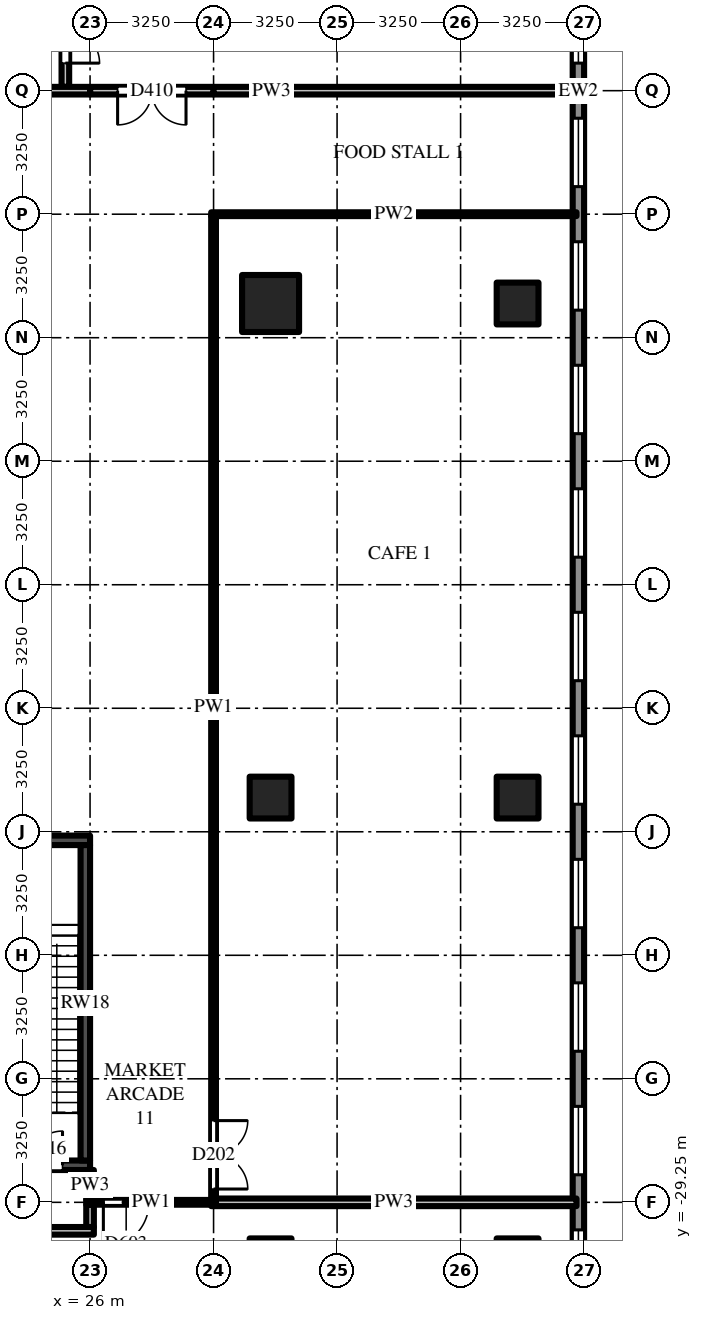
"""IFC4 building model, lengths in metres.
Left out: names, types, materials, properties, quantities, classifications, styles, units other than length and angle.
Written with IfcOpenShell. Run it as: python <this file> out.ifc"""

import sys

from ifc_helpers import new_model, si_unit, direction, frame, frame_2d, origin, origin_2d, place, context, subcontext, project, spatial, rectangle, extrude, source, transform, mapped, element, fill, save


model = new_model("IFC4")
c1 = context("Model", 3, precision=1e-05, world=origin(), true_north=direction((0.0, 1.0)))
c2 = subcontext(c1, "Body", "Model", "MODEL_VIEW")
j1 = project(units=[si_unit("LENGTHUNIT", "METRE"), si_unit("PLANEANGLEUNIT", "RADIAN")], contexts=[c1])
p1 = place(None, origin())
s1 = spatial("IfcSite", under=j1, at=p1, CompositionType="ELEMENT")
p2 = place(p1, origin())
s2 = spatial("IfcBuilding", under=s1, at=p2, CompositionType="ELEMENT")
p3 = place(p2, frame((0.0, 0.0, 19.0)))
s3 = spatial("IfcBuildingStorey", under=s2, at=p3, CompositionType="ELEMENT", Elevation=19.0)
m1 = source(origin(), c2, "Body", "SweptSolid", [
    extrude(rectangle(XDim=1.5, YDim=1.5, at=origin_2d()), origin(), (0.0, 0.0, 1.0), 5.0),
])
p4 = place(p3, frame((30.75, -5.6, 0.0), z_axis=(0.0, 0.0, 1.0), x_axis=(1.0, 0.0, 0.0)))
e1 = element("IfcColumn", 1, at=p4, inside=s3, PredefinedType="COLUMN", context=c2, shape_type="MappedRepresentation", body=[
    mapped(m1, transform((0.0, 0.0, 0.0))),
])
m2 = source(origin(), c2, "Body", "SweptSolid", [
    extrude(rectangle(XDim=1.1, YDim=1.1, at=origin_2d()), origin(), (0.0, 0.0, 1.0), 5.0),
])
for number, where, z_axis, x_axis in (
    (2, (30.75, -18.6, 0.0), (0.0, 0.0, 1.0), (1.0, 0.0, 0.0)),
    (3, (30.75, -30.75, 0.0), (0.0, 0.0, 1.0), (1.0, 0.0, 0.0)),
    (4, (37.25, -5.6, 0.0), (0.0, 0.0, 1.0), (1.0, 0.0, 0.0)),
    (5, (37.25, -18.6, 0.0), (0.0, 0.0, 1.0), (1.0, 0.0, 0.0)),
    (6, (37.25, -30.75, 0.0), (0.0, 0.0, 1.0), (1.0, 0.0, 0.0)),
):
    element("IfcColumn", number, at=place(p3, frame(where, z_axis=z_axis, x_axis=x_axis)), inside=s3, PredefinedType="COLUMN", context=c2, shape_type="MappedRepresentation", body=[
        mapped(m2, transform((0.0, 0.0, 0.0))),
    ])
m3 = source(origin(), c2, "Body", "SweptSolid", [
    extrude(rectangle(XDim=6.5, YDim=0.25, at=frame_2d((3.25, 0.0))), origin(), (0.0, 0.0, 1.0), 4.7),
])
p5 = place(p3, frame((19.5, -28.275, 0.0), z_axis=(0.0, 0.0, 1.0), x_axis=(1.0, 0.0, 0.0)))
e7 = element("IfcWall", 7, at=p5, inside=s3, PredefinedType="SHEAR", context=c2, shape_type="MappedRepresentation", body=[
    mapped(m3, transform((0.0, 0.0, 0.0))),
])
m4 = source(origin(), c2, "Body", "SweptSolid", [
    extrude(rectangle(XDim=1.8, YDim=2.1, at=frame_2d((0.9, 1.05))), frame((0.0, 0.135, 0.0), z_axis=(0.0, -1.0, 0.0), x_axis=(1.0, 0.0, 0.0)), (0.0, 0.0, 1.0), 0.27),
])
p6 = place(p5, frame((0.725, 0.0, 0.0)))
e8 = element("IfcOpeningElement", 8, at=p6, cuts=e7, PredefinedType="OPENING", context=c2, shape_type="MappedRepresentation", body=[
    mapped(m4, transform((0.0, 0.0, 0.0))),
])
p7 = place(p5, frame((3.975, 0.0, 0.0)))
e9 = element("IfcOpeningElement", 9, at=p7, cuts=e7, PredefinedType="OPENING", context=c2, shape_type="MappedRepresentation", body=[
    mapped(m4, transform((0.0, 0.0, 0.0))),
])
p8 = place(p3, frame((19.5, -19.725, 0.0), z_axis=(0.0, 0.0, 1.0), x_axis=(1.0, 0.0, 0.0)))
e10 = element("IfcWall", 10, at=p8, inside=s3, PredefinedType="SHEAR", context=c2, shape_type="MappedRepresentation", body=[
    mapped(m3, transform((0.0, 0.0, 0.0))),
])
m5 = source(origin(), c2, "Body", "SweptSolid", [
    extrude(rectangle(XDim=8.3, YDim=0.25, at=frame_2d((4.15, 0.0))), origin(), (0.0, 0.0, 1.0), 4.7),
])
p9 = place(p3, frame((25.875, -28.15, 0.0), z_axis=(0.0, 0.0, 1.0), x_axis=(0.0, 1.0, 0.0)))
e11 = element("IfcWall", 11, at=p9, inside=s3, PredefinedType="SHEAR", context=c2, shape_type="MappedRepresentation", body=[
    mapped(m5, transform((0.0, 0.0, 0.0))),
])
m6 = source(origin(), c2, "Body", "SweptSolid", [
    extrude(rectangle(XDim=71.5, YDim=0.3, at=frame_2d((35.75, 0.0))), origin(), (0.0, 0.0, 1.0), 4.7),
])
p10 = place(p3, frame((38.85, -35.75, 0.0), z_axis=(0.0, 0.0, 1.0), x_axis=(0.0, 1.0, 0.0)))
e12 = element("IfcWall", 12, at=p10, inside=s3, PredefinedType="SOLIDWALL", context=c2, shape_type="MappedRepresentation", body=[
    mapped(m6, transform((0.0, 0.0, 0.0))),
])
m7 = source(origin(), c2, "Body", "SweptSolid", [
    extrude(rectangle(XDim=1.8, YDim=3.0, at=frame_2d((0.9, 1.5))), frame((0.0, 0.16, 0.0), z_axis=(0.0, -1.0, 0.0), x_axis=(1.0, 0.0, 0.0)), (0.0, 0.0, 1.0), 0.32),
])
p11 = place(p10, frame((0.725, 0.0, 0.9)))
e13 = element("IfcOpeningElement", 13, at=p11, cuts=e12, PredefinedType="OPENING", context=c2, shape_type="MappedRepresentation", body=[
    mapped(m7, transform((0.0, 0.0, 0.0))),
])
p12 = place(p10, frame((3.975, 0.0, 0.9)))
e14 = element("IfcOpeningElement", 14, at=p12, cuts=e12, PredefinedType="OPENING", context=c2, shape_type="MappedRepresentation", body=[
    mapped(m7, transform((0.0, 0.0, 0.0))),
])
p13 = place(p10, frame((7.225, 0.0, 0.9)))
e15 = element("IfcOpeningElement", 15, at=p13, cuts=e12, PredefinedType="OPENING", context=c2, shape_type="MappedRepresentation", body=[
    mapped(m7, transform((0.0, 0.0, 0.0))),
])
p14 = place(p10, frame((10.475, 0.0, 0.9)))
e16 = element("IfcOpeningElement", 16, at=p14, cuts=e12, PredefinedType="OPENING", context=c2, shape_type="MappedRepresentation", body=[
    mapped(m7, transform((0.0, 0.0, 0.0))),
])
p15 = place(p10, frame((13.725, 0.0, 0.9)))
e17 = element("IfcOpeningElement", 17, at=p15, cuts=e12, PredefinedType="OPENING", context=c2, shape_type="MappedRepresentation", body=[
    mapped(m7, transform((0.0, 0.0, 0.0))),
])
p16 = place(p10, frame((16.975, 0.0, 0.9)))
e18 = element("IfcOpeningElement", 18, at=p16, cuts=e12, PredefinedType="OPENING", context=c2, shape_type="MappedRepresentation", body=[
    mapped(m7, transform((0.0, 0.0, 0.0))),
])
p17 = place(p10, frame((20.225, 0.0, 0.9)))
e19 = element("IfcOpeningElement", 19, at=p17, cuts=e12, PredefinedType="OPENING", context=c2, shape_type="MappedRepresentation", body=[
    mapped(m7, transform((0.0, 0.0, 0.0))),
])
p18 = place(p10, frame((23.475, 0.0, 0.9)))
e20 = element("IfcOpeningElement", 20, at=p18, cuts=e12, PredefinedType="OPENING", context=c2, shape_type="MappedRepresentation", body=[
    mapped(m7, transform((0.0, 0.0, 0.0))),
])
p19 = place(p10, frame((26.725, 0.0, 0.9)))
e21 = element("IfcOpeningElement", 21, at=p19, cuts=e12, PredefinedType="OPENING", context=c2, shape_type="MappedRepresentation", body=[
    mapped(m7, transform((0.0, 0.0, 0.0))),
])
p20 = place(p10, frame((29.975, 0.0, 0.9)))
e22 = element("IfcOpeningElement", 22, at=p20, cuts=e12, PredefinedType="OPENING", context=c2, shape_type="MappedRepresentation", body=[
    mapped(m7, transform((0.0, 0.0, 0.0))),
])
p21 = place(p10, frame((33.225, 0.0, 0.9)))
e23 = element("IfcOpeningElement", 23, at=p21, cuts=e12, PredefinedType="OPENING", context=c2, shape_type="MappedRepresentation", body=[
    mapped(m7, transform((0.0, 0.0, 0.0))),
])
p22 = place(p10, frame((36.475, 0.0, 0.9)))
e24 = element("IfcOpeningElement", 24, at=p22, cuts=e12, PredefinedType="OPENING", context=c2, shape_type="MappedRepresentation", body=[
    mapped(m7, transform((0.0, 0.0, 0.0))),
])
p23 = place(p10, frame((39.725, 0.0, 0.9)))
e25 = element("IfcOpeningElement", 25, at=p23, cuts=e12, PredefinedType="OPENING", context=c2, shape_type="MappedRepresentation", body=[
    mapped(m7, transform((0.0, 0.0, 0.0))),
])
p24 = place(p10, frame((42.975, 0.0, 0.9)))
e26 = element("IfcOpeningElement", 26, at=p24, cuts=e12, PredefinedType="OPENING", context=c2, shape_type="MappedRepresentation", body=[
    mapped(m7, transform((0.0, 0.0, 0.0))),
])
p25 = place(p10, frame((46.225, 0.0, 0.9)))
e27 = element("IfcOpeningElement", 27, at=p25, cuts=e12, PredefinedType="OPENING", context=c2, shape_type="MappedRepresentation", body=[
    mapped(m7, transform((0.0, 0.0, 0.0))),
])
p26 = place(p10, frame((49.475, 0.0, 0.9)))
e28 = element("IfcOpeningElement", 28, at=p26, cuts=e12, PredefinedType="OPENING", context=c2, shape_type="MappedRepresentation", body=[
    mapped(m7, transform((0.0, 0.0, 0.0))),
])
p27 = place(p10, frame((52.725, 0.0, 0.9)))
e29 = element("IfcOpeningElement", 29, at=p27, cuts=e12, PredefinedType="OPENING", context=c2, shape_type="MappedRepresentation", body=[
    mapped(m7, transform((0.0, 0.0, 0.0))),
])
p28 = place(p10, frame((55.975, 0.0, 0.9)))
e30 = element("IfcOpeningElement", 30, at=p28, cuts=e12, PredefinedType="OPENING", context=c2, shape_type="MappedRepresentation", body=[
    mapped(m7, transform((0.0, 0.0, 0.0))),
])
p29 = place(p10, frame((59.225, 0.0, 0.9)))
e31 = element("IfcOpeningElement", 31, at=p29, cuts=e12, PredefinedType="OPENING", context=c2, shape_type="MappedRepresentation", body=[
    mapped(m7, transform((0.0, 0.0, 0.0))),
])
p30 = place(p10, frame((62.475, 0.0, 0.9)))
e32 = element("IfcOpeningElement", 32, at=p30, cuts=e12, PredefinedType="OPENING", context=c2, shape_type="MappedRepresentation", body=[
    mapped(m7, transform((0.0, 0.0, 0.0))),
])
p31 = place(p10, frame((65.725, 0.0, 0.9)))
e33 = element("IfcOpeningElement", 33, at=p31, cuts=e12, PredefinedType="OPENING", context=c2, shape_type="MappedRepresentation", body=[
    mapped(m7, transform((0.0, 0.0, 0.0))),
])
p32 = place(p10, frame((68.975, 0.0, 0.9)))
e34 = element("IfcOpeningElement", 34, at=p32, cuts=e12, PredefinedType="OPENING", context=c2, shape_type="MappedRepresentation", body=[
    mapped(m7, transform((0.0, 0.0, 0.0))),
])
m8 = source(origin(), c2, "Body", "SweptSolid", [
    extrude(rectangle(XDim=3.05, YDim=0.2, at=frame_2d((1.525, 0.0))), origin(), (0.0, 0.0, 1.0), 4.077),
])
p33 = place(p3, frame((25.35, 3.15, 0.0), z_axis=(0.0, 0.0, 1.0), x_axis=(0.0, -1.0, 0.0)))
e35 = element("IfcWall", 35, at=p33, inside=s3, PredefinedType="PARTITIONING", context=c2, shape_type="MappedRepresentation", body=[
    mapped(m8, transform((0.0, 0.0, 0.0))),
])
m9 = source(origin(), c2, "Body", "SweptSolid", [
    extrude(rectangle(XDim=1.8, YDim=2.1, at=frame_2d((0.9, 1.05))), frame((0.0, 0.11, 0.0), z_axis=(0.0, -1.0, 0.0), x_axis=(1.0, 0.0, 0.0)), (0.0, 0.0, 1.0), 0.22),
])
p34 = place(p33, frame((0.625, 0.0, 0.0)))
e36 = element("IfcOpeningElement", 36, at=p34, cuts=e35, PredefinedType="OPENING", context=c2, shape_type="MappedRepresentation", body=[
    mapped(m9, transform((0.0, 0.0, 0.0))),
])
m10 = source(origin(), c2, "Body", "SweptSolid", [
    extrude(rectangle(XDim=0.788, YDim=0.2, at=frame_2d((0.394, 0.0))), origin(), (0.0, 0.0, 1.0), 4.7),
])
p35 = place(p3, frame((26.0, -29.188, 0.0), z_axis=(0.0, 0.0, 1.0), x_axis=(0.0, 1.0, 0.0)))
e37 = element("IfcWall", 37, at=p35, inside=s3, PredefinedType="PARTITIONING", context=c2, shape_type="MappedRepresentation", body=[
    mapped(m10, transform((0.0, 0.0, 0.0))),
])
m11 = source(origin(), c2, "Body", "SweptSolid", [
    extrude(rectangle(XDim=0.587, YDim=0.2, at=frame_2d((0.294, 0.0))), origin(), (0.0, 0.0, 1.0), 4.7),
])
p36 = place(p3, frame((26.0, -29.312, 0.0), z_axis=(0.0, 0.0, 1.0), x_axis=(0.0, -1.0, 0.0)))
e38 = element("IfcWall", 38, at=p36, inside=s3, PredefinedType="PARTITIONING", context=c2, shape_type="MappedRepresentation", body=[
    mapped(m11, transform((0.0, 0.0, 0.0))),
])
p37 = place(p3, frame((29.25, -3.3, 0.0), z_axis=(0.0, 0.0, 1.0), x_axis=(0.0, -1.0, 0.0)))
e39 = element("IfcWall", 39, at=p37, inside=s3, PredefinedType="PARTITIONING", context=c2, shape_type="SweptSolid", body=[
    extrude(rectangle(XDim=25.85, YDim=0.125, at=frame_2d((12.925, 0.0))), origin(), (0.0, 0.0, 1.0), 3.762),
])
m12 = source(origin(), c2, "Body", "SweptSolid", [
    extrude(rectangle(XDim=1.8, YDim=2.1, at=frame_2d((0.9, 1.05))), frame((0.0, 0.073, 0.0), z_axis=(0.0, -1.0, 0.0), x_axis=(1.0, 0.0, 0.0)), (0.0, 0.0, 1.0), 0.145),
])
p38 = place(p37, frame((23.8, 0.0, 0.0)))
e40 = element("IfcOpeningElement", 40, at=p38, cuts=e39, PredefinedType="OPENING", context=c2, shape_type="MappedRepresentation", body=[
    mapped(m12, transform((0.0, 0.0, 0.0))),
])
m13 = source(origin(), c2, "Body", "SweptSolid", [
    extrude(rectangle(XDim=8.2, YDim=0.2, at=frame_2d((4.1, 0.0))), origin(), (0.0, 0.0, 1.0), 3.762),
])
p39 = place(p3, frame((26.1, -30.0, 0.0), z_axis=(0.0, 0.0, 1.0), x_axis=(-1.0, 0.0, 0.0)))
e41 = element("IfcWall", 41, at=p39, inside=s3, PredefinedType="PARTITIONING", context=c2, shape_type="MappedRepresentation", body=[
    mapped(m13, transform((0.0, 0.0, 0.0))),
])
m14 = source(origin(), c2, "Body", "SweptSolid", [
    extrude(rectangle(XDim=9.613, YDim=0.2, at=frame_2d((4.806, 0.0))), origin(), (0.0, 0.0, 1.0), 3.762),
])
p40 = place(p3, frame((29.188, -29.25, 0.0), z_axis=(0.0, 0.0, 1.0), x_axis=(1.0, 0.0, 0.0)))
e42 = element("IfcWall", 42, at=p40, inside=s3, PredefinedType="PARTITIONING", context=c2, shape_type="MappedRepresentation", body=[
    mapped(m14, transform((0.0, 0.0, 0.0))),
])
m15 = source(origin(), c2, "Body", "SweptSolid", [
    extrude(rectangle(XDim=3.413, YDim=0.125, at=frame_2d((1.706, 0.0))), origin(), (0.0, 0.0, 1.0), 4.7),
])
p41 = place(p3, frame((29.312, -29.25, 0.0), z_axis=(0.0, 0.0, 1.0), x_axis=(-1.0, 0.0, 0.0)))
e43 = element("IfcWall", 43, at=p41, inside=s3, PredefinedType="PARTITIONING", context=c2, shape_type="MappedRepresentation", body=[
    mapped(m15, transform((0.0, 0.0, 0.0))),
])
m16 = source(origin(), c2, "Body", "SweptSolid", [
    extrude(rectangle(XDim=1.2, YDim=2.1, at=frame_2d((0.6, 1.05))), frame((0.0, 0.073, 0.0), z_axis=(0.0, -1.0, 0.0), x_axis=(1.0, 0.0, 0.0)), (0.0, 0.0, 1.0), 0.145),
])
p42 = place(p41, frame((1.762, 0.0, 0.0)))
e44 = element("IfcOpeningElement", 44, at=p42, cuts=e43, PredefinedType="OPENING", context=c2, shape_type="MappedRepresentation", body=[
    mapped(m16, transform((0.0, 0.0, 0.0))),
])
p43 = place(p3, frame((29.188, -3.25, 0.0), z_axis=(0.0, 0.0, 1.0), x_axis=(1.0, 0.0, 0.0)))
e45 = element("IfcWall", 45, at=p43, inside=s3, PredefinedType="PARTITIONING", context=c2, shape_type="SweptSolid", body=[
    extrude(rectangle(XDim=9.613, YDim=0.1, at=frame_2d((4.806, 0.0))), origin(), (0.0, 0.0, 1.0), 3.918),
])
m17 = source(origin(), c2, "Body", "SweptSolid", [
    extrude(rectangle(XDim=3.25, YDim=0.2, at=frame_2d((1.625, 0.0))), origin(), (0.0, 0.0, 1.0), 4.077),
])
p44 = place(p3, frame((29.25, 0.0, 0.0), z_axis=(0.0, 0.0, 1.0), x_axis=(-1.0, 0.0, 0.0)))
e46 = element("IfcWall", 46, at=p44, inside=s3, PredefinedType="PARTITIONING", context=c2, shape_type="MappedRepresentation", body=[
    mapped(m17, transform((0.0, 0.0, 0.0))),
])
p45 = place(p44, frame((0.725, 0.0, 0.0)))
e47 = element("IfcOpeningElement", 47, at=p45, cuts=e46, PredefinedType="OPENING", context=c2, shape_type="MappedRepresentation", body=[
    mapped(m9, transform((0.0, 0.0, 0.0))),
])
m18 = source(origin(), c2, "Body", "SweptSolid", [
    extrude(rectangle(XDim=2.0, YDim=0.2, at=frame_2d((1.0, 0.0))), origin(), (0.0, 0.0, 1.0), 4.077),
])
p46 = place(p3, frame((26.0, 0.0, 0.0), z_axis=(0.0, 0.0, 1.0), x_axis=(-1.0, 0.0, 0.0)))
e48 = element("IfcWall", 48, at=p46, inside=s3, PredefinedType="PARTITIONING", context=c2, shape_type="MappedRepresentation", body=[
    mapped(m18, transform((0.0, 0.0, 0.0))),
])
m19 = source(origin(), c2, "Body", "SweptSolid", [
    extrude(rectangle(XDim=9.55, YDim=0.2, at=frame_2d((4.775, 0.0))), origin(), (0.0, 0.0, 1.0), 3.918),
])
p47 = place(p3, frame((38.8, 0.0, 0.0), z_axis=(0.0, 0.0, 1.0), x_axis=(-1.0, 0.0, 0.0)))
e49 = element("IfcWall", 49, at=p47, inside=s3, PredefinedType="PARTITIONING", context=c2, shape_type="MappedRepresentation", body=[
    mapped(m19, transform((0.0, 0.0, 0.0))),
])
m20 = source(origin(), c2, "Body", "SweptSolid", [
    extrude(rectangle(XDim=1.8, YDim=2.1, at=frame_2d((0.9, 1.05))), frame((0.0, 0.025, 0.0), z_axis=(0.0, -1.0, 0.0), x_axis=(1.0, 0.0, 0.0)), (0.0, 0.0, 1.0), 0.05),
])
p48 = place(p7, origin())
e50 = element("IfcDoor", 50, at=p48, inside=s3, OperationType="DOUBLE_DOOR_SINGLE_SWING", PredefinedType="DOOR", context=c2, shape_type="MappedRepresentation", body=[
    mapped(m20, transform((0.0, 0.0, 0.0))),
])
fill(e9, e50)
m21 = source(origin(), c2, "Body", "SweptSolid", [
    extrude(rectangle(XDim=1.8, YDim=3.0, at=frame_2d((0.9, 1.5))), frame((0.0, 0.03, 0.0), z_axis=(0.0, -1.0, 0.0), x_axis=(1.0, 0.0, 0.0)), (0.0, 0.0, 1.0), 0.06),
])
p49 = place(p12, origin())
e51 = element("IfcWindow", 51, at=p49, inside=s3, PartitioningType="SINGLE_PANEL", PredefinedType="WINDOW", context=c2, shape_type="MappedRepresentation", body=[
    mapped(m21, transform((0.0, 0.0, 0.0))),
])
fill(e14, e51)
p50 = place(p13, origin())
e52 = element("IfcWindow", 52, at=p50, inside=s3, PartitioningType="SINGLE_PANEL", PredefinedType="WINDOW", context=c2, shape_type="MappedRepresentation", body=[
    mapped(m21, transform((0.0, 0.0, 0.0))),
])
fill(e15, e52)
p51 = place(p14, origin())
e53 = element("IfcWindow", 53, at=p51, inside=s3, PartitioningType="SINGLE_PANEL", PredefinedType="WINDOW", context=c2, shape_type="MappedRepresentation", body=[
    mapped(m21, transform((0.0, 0.0, 0.0))),
])
fill(e16, e53)
p52 = place(p15, origin())
e54 = element("IfcWindow", 54, at=p52, inside=s3, PartitioningType="SINGLE_PANEL", PredefinedType="WINDOW", context=c2, shape_type="MappedRepresentation", body=[
    mapped(m21, transform((0.0, 0.0, 0.0))),
])
fill(e17, e54)
p53 = place(p16, origin())
e55 = element("IfcWindow", 55, at=p53, inside=s3, PartitioningType="SINGLE_PANEL", PredefinedType="WINDOW", context=c2, shape_type="MappedRepresentation", body=[
    mapped(m21, transform((0.0, 0.0, 0.0))),
])
fill(e18, e55)
p54 = place(p17, origin())
e56 = element("IfcWindow", 56, at=p54, inside=s3, PartitioningType="SINGLE_PANEL", PredefinedType="WINDOW", context=c2, shape_type="MappedRepresentation", body=[
    mapped(m21, transform((0.0, 0.0, 0.0))),
])
fill(e19, e56)
p55 = place(p18, origin())
e57 = element("IfcWindow", 57, at=p55, inside=s3, PartitioningType="SINGLE_PANEL", PredefinedType="WINDOW", context=c2, shape_type="MappedRepresentation", body=[
    mapped(m21, transform((0.0, 0.0, 0.0))),
])
fill(e20, e57)
p56 = place(p19, origin())
e58 = element("IfcWindow", 58, at=p56, inside=s3, PartitioningType="SINGLE_PANEL", PredefinedType="WINDOW", context=c2, shape_type="MappedRepresentation", body=[
    mapped(m21, transform((0.0, 0.0, 0.0))),
])
fill(e21, e58)
p57 = place(p20, origin())
e59 = element("IfcWindow", 59, at=p57, inside=s3, PartitioningType="SINGLE_PANEL", PredefinedType="WINDOW", context=c2, shape_type="MappedRepresentation", body=[
    mapped(m21, transform((0.0, 0.0, 0.0))),
])
fill(e22, e59)
p58 = place(p21, origin())
e60 = element("IfcWindow", 60, at=p58, inside=s3, PartitioningType="SINGLE_PANEL", PredefinedType="WINDOW", context=c2, shape_type="MappedRepresentation", body=[
    mapped(m21, transform((0.0, 0.0, 0.0))),
])
fill(e23, e60)
p59 = place(p22, origin())
e61 = element("IfcWindow", 61, at=p59, inside=s3, PartitioningType="SINGLE_PANEL", PredefinedType="WINDOW", context=c2, shape_type="MappedRepresentation", body=[
    mapped(m21, transform((0.0, 0.0, 0.0))),
])
fill(e24, e61)
m22 = source(origin(), c2, "Body", "SweptSolid", [
    extrude(rectangle(XDim=1.2, YDim=2.1, at=frame_2d((0.6, 1.05))), frame((0.0, 0.025, 0.0), z_axis=(0.0, -1.0, 0.0), x_axis=(1.0, 0.0, 0.0)), (0.0, 0.0, 1.0), 0.05),
])
p60 = place(p42, origin())
e62 = element("IfcDoor", 62, at=p60, inside=s3, OperationType="SINGLE_SWING_RIGHT", PredefinedType="DOOR", context=c2, shape_type="MappedRepresentation", body=[
    mapped(m22, transform((0.0, 0.0, 0.0))),
])
fill(e44, e62)
p61 = place(p38, origin())
e63 = element("IfcDoor", 63, at=p61, inside=s3, OperationType="DOUBLE_DOOR_SINGLE_SWING", PredefinedType="DOOR", context=c2, shape_type="MappedRepresentation", body=[
    mapped(m20, transform((0.0, 0.0, 0.0))),
])
fill(e40, e63)
p62 = place(p45, origin())
e64 = element("IfcDoor", 64, at=p62, inside=s3, OperationType="DOUBLE_DOOR_SINGLE_SWING", PredefinedType="DOOR", context=c2, shape_type="MappedRepresentation", body=[
    mapped(m20, transform((0.0, 0.0, 0.0))),
])
fill(e47, e64)
p63 = place(p34, origin())
e65 = element("IfcDoor", 65, at=p63, inside=s3, OperationType="DOUBLE_DOOR_SINGLE_SWING", PredefinedType="DOOR", context=c2, shape_type="MappedRepresentation", body=[
    mapped(m20, transform((0.0, 0.0, 0.0))),
])
fill(e36, e65)
save(model, sys.argv[1])
